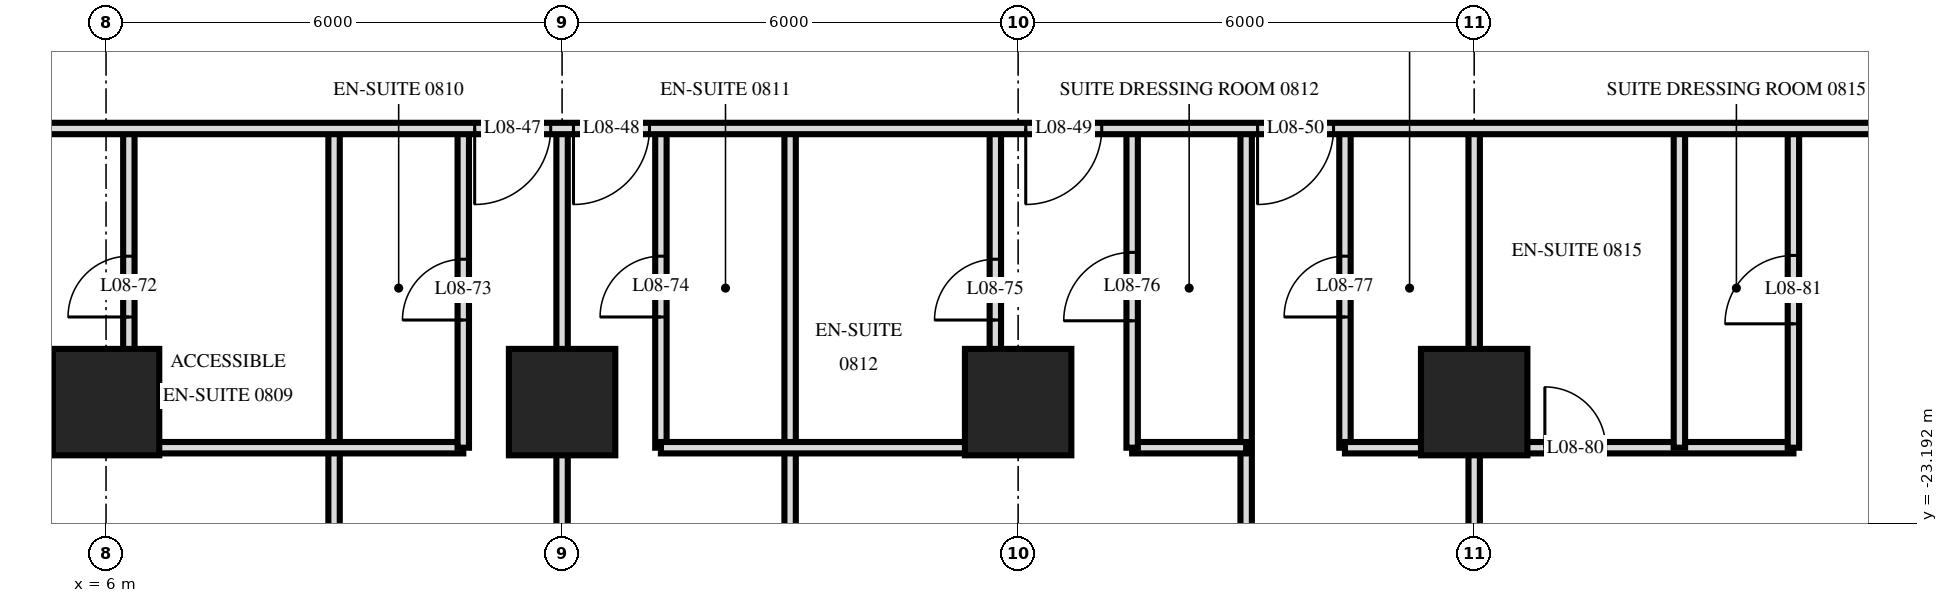
"""IFC4 building model, lengths in metres.
Left out: names, types, materials, properties, quantities, classifications, styles, units other than length and angle.
Written with IfcOpenShell. Run it as: python <this file> out.ifc"""

import sys

from ifc_helpers import new_model, si_unit, direction, frame, frame_2d, origin, origin_2d, place, context, subcontext, project, spatial, rectangle, extrude, element, fill, save


model = new_model("IFC4")
c1 = context("Model", 3, precision=1e-05, world=origin(), true_north=direction((0.0, 1.0)))
c2 = subcontext(c1, "Body", "Model", "MODEL_VIEW")
j1 = project(units=[si_unit("LENGTHUNIT", "METRE"), si_unit("PLANEANGLEUNIT", "RADIAN")], contexts=[c1])
p1 = place(None, origin())
s1 = spatial("IfcSite", under=j1, at=p1, CompositionType="ELEMENT")
p2 = place(p1, origin())
s2 = spatial("IfcBuilding", under=s1, at=p2, CompositionType="ELEMENT")
p3 = place(p2, frame((0.0, 0.0, 38.4)))
s3 = spatial("IfcBuildingStorey", under=s2, at=p3, CompositionType="ELEMENT", Elevation=38.4)
for number, where, z_axis, x_axis in (
    (1, (6.0, -21.6, 0.0), (0.0, 0.0, 1.0), (1.0, 0.0, 0.0)),
    (2, (12.0, -21.6, 0.0), (0.0, 0.0, 1.0), (1.0, 0.0, 0.0)),
    (3, (18.0, -21.6, 0.0), (0.0, 0.0, 1.0), (1.0, 0.0, 0.0)),
    (4, (24.0, -21.6, 0.0), (0.0, 0.0, 1.0), (1.0, 0.0, 0.0)),
):
    element("IfcColumn", number, at=place(p3, frame(where, z_axis=z_axis, x_axis=x_axis)), inside=s3, PredefinedType="COLUMN", context=c2, shape_type="SweptSolid", body=[
        extrude(rectangle(XDim=1.4, YDim=1.4, at=origin_2d()), origin(), (0.0, 0.0, 1.0), 3.6),
    ])
p4 = place(p3, frame((28.2, -22.2, 0.0), z_axis=(0.0, 0.0, 1.0), x_axis=(0.0, 1.0, 0.0)))
e5 = element("IfcWall", 5, at=p4, inside=s3, PredefinedType="PARTITIONING", context=c2, shape_type="SweptSolid", body=[
    extrude(rectangle(XDim=4.2, YDim=0.15, at=frame_2d((2.1, 0.0))), origin(), (0.0, 0.0, 1.0), 3.32),
])
p5 = place(p4, frame((1.63, 0.0, 0.0)))
e6 = element("IfcOpeningElement", 6, at=p5, cuts=e5, PredefinedType="OPENING", context=c2, shape_type="SweptSolid", body=[
    extrude(rectangle(XDim=0.9, YDim=2.1, at=frame_2d((0.45, 1.05))), frame((0.0, 0.085, 0.0), z_axis=(0.0, -1.0, 0.0), x_axis=(1.0, 0.0, 0.0)), (0.0, 0.0, 1.0), 0.17),
])
p6 = place(p3, frame((26.7, -22.2, 0.0), z_axis=(0.0, 0.0, 1.0), x_axis=(0.0, 1.0, 0.0)))
e7 = element("IfcWall", 7, at=p6, inside=s3, PredefinedType="PARTITIONING", context=c2, shape_type="SweptSolid", body=[
    extrude(rectangle(XDim=4.2, YDim=0.15, at=frame_2d((2.1, 0.0))), origin(), (0.0, 0.0, 1.0), 3.32),
])
p7 = place(p3, frame((24.0, -29.22, 0.0), z_axis=(0.0, 0.0, 1.0), x_axis=(0.0, 1.0, 0.0)))
e8 = element("IfcWall", 8, at=p7, inside=s3, PredefinedType="PARTITIONING", context=c2, shape_type="SweptSolid", body=[
    extrude(rectangle(XDim=11.22, YDim=0.15, at=frame_2d((5.61, 0.0))), origin(), (0.0, 0.0, 1.0), 3.32),
])
p8 = place(p3, frame((22.3, -22.2, 0.0), z_axis=(0.0, 0.0, 1.0), x_axis=(0.0, 1.0, 0.0)))
e9 = element("IfcWall", 9, at=p8, inside=s3, PredefinedType="PARTITIONING", context=c2, shape_type="SweptSolid", body=[
    extrude(rectangle(XDim=4.2, YDim=0.15, at=frame_2d((2.1, 0.0))), origin(), (0.0, 0.0, 1.0), 3.32),
])
p9 = place(p8, frame((1.72, 0.0, 0.0)))
e10 = element("IfcOpeningElement", 10, at=p9, cuts=e9, PredefinedType="OPENING", context=c2, shape_type="SweptSolid", body=[
    extrude(rectangle(XDim=0.8, YDim=2.1, at=frame_2d((0.4, 1.05))), frame((0.0, 0.085, 0.0), z_axis=(0.0, -1.0, 0.0), x_axis=(1.0, 0.0, 0.0)), (0.0, 0.0, 1.0), 0.17),
])
p10 = place(p3, frame((21.0, -29.22, 0.0), z_axis=(0.0, 0.0, 1.0), x_axis=(0.0, 1.0, 0.0)))
e11 = element("IfcWall", 11, at=p10, inside=s3, PredefinedType="PARTITIONING", context=c2, shape_type="SweptSolid", body=[
    extrude(rectangle(XDim=11.22, YDim=0.15, at=frame_2d((5.61, 0.0))), origin(), (0.0, 0.0, 1.0), 3.32),
])
p11 = place(p3, frame((19.5, -22.2, 0.0), z_axis=(0.0, 0.0, 1.0), x_axis=(0.0, 1.0, 0.0)))
e12 = element("IfcWall", 12, at=p11, inside=s3, PredefinedType="PARTITIONING", context=c2, shape_type="SweptSolid", body=[
    extrude(rectangle(XDim=4.2, YDim=0.15, at=frame_2d((2.1, 0.0))), origin(), (0.0, 0.0, 1.0), 3.32),
])
p12 = place(p11, frame((1.67, 0.0, 0.0)))
e13 = element("IfcOpeningElement", 13, at=p12, cuts=e12, PredefinedType="OPENING", context=c2, shape_type="SweptSolid", body=[
    extrude(rectangle(XDim=0.9, YDim=2.1, at=frame_2d((0.45, 1.05))), frame((0.0, 0.085, 0.0), z_axis=(0.0, -1.0, 0.0), x_axis=(1.0, 0.0, 0.0)), (0.0, 0.0, 1.0), 0.17),
])
p13 = place(p3, frame((17.7, -22.2, 0.0), z_axis=(0.0, 0.0, 1.0), x_axis=(0.0, 1.0, 0.0)))
e14 = element("IfcWall", 14, at=p13, inside=s3, PredefinedType="PARTITIONING", context=c2, shape_type="SweptSolid", body=[
    extrude(rectangle(XDim=4.2, YDim=0.15, at=frame_2d((2.1, 0.0))), origin(), (0.0, 0.0, 1.0), 3.32),
])
p14 = place(p13, frame((1.68, 0.0, 0.0)))
e15 = element("IfcOpeningElement", 15, at=p14, cuts=e14, PredefinedType="OPENING", context=c2, shape_type="SweptSolid", body=[
    extrude(rectangle(XDim=0.8, YDim=2.1, at=frame_2d((0.4, 1.05))), frame((0.0, 0.085, 0.0), z_axis=(0.0, -1.0, 0.0), x_axis=(1.0, 0.0, 0.0)), (0.0, 0.0, 1.0), 0.17),
])
p15 = place(p3, frame((15.0, -29.22, 0.0), z_axis=(0.0, 0.0, 1.0), x_axis=(0.0, 1.0, 0.0)))
e16 = element("IfcWall", 16, at=p15, inside=s3, PredefinedType="PARTITIONING", context=c2, shape_type="SweptSolid", body=[
    extrude(rectangle(XDim=11.22, YDim=0.15, at=frame_2d((5.61, 0.0))), origin(), (0.0, 0.0, 1.0), 3.32),
])
p16 = place(p3, frame((13.3, -22.2, 0.0), z_axis=(0.0, 0.0, 1.0), x_axis=(0.0, 1.0, 0.0)))
e17 = element("IfcWall", 17, at=p16, inside=s3, PredefinedType="PARTITIONING", context=c2, shape_type="SweptSolid", body=[
    extrude(rectangle(XDim=4.2, YDim=0.15, at=frame_2d((2.1, 0.0))), origin(), (0.0, 0.0, 1.0), 3.32),
])
p17 = place(p16, frame((1.72, 0.0, 0.0)))
e18 = element("IfcOpeningElement", 18, at=p17, cuts=e17, PredefinedType="OPENING", context=c2, shape_type="SweptSolid", body=[
    extrude(rectangle(XDim=0.8, YDim=2.1, at=frame_2d((0.4, 1.05))), frame((0.0, 0.085, 0.0), z_axis=(0.0, -1.0, 0.0), x_axis=(1.0, 0.0, 0.0)), (0.0, 0.0, 1.0), 0.17),
])
p18 = place(p3, frame((12.0, -29.22, 0.0), z_axis=(0.0, 0.0, 1.0), x_axis=(0.0, 1.0, 0.0)))
e19 = element("IfcWall", 19, at=p18, inside=s3, PredefinedType="PARTITIONING", context=c2, shape_type="SweptSolid", body=[
    extrude(rectangle(XDim=11.22, YDim=0.15, at=frame_2d((5.61, 0.0))), origin(), (0.0, 0.0, 1.0), 3.32),
])
p19 = place(p3, frame((10.7, -22.2, 0.0), z_axis=(0.0, 0.0, 1.0), x_axis=(0.0, 1.0, 0.0)))
e20 = element("IfcWall", 20, at=p19, inside=s3, PredefinedType="PARTITIONING", context=c2, shape_type="SweptSolid", body=[
    extrude(rectangle(XDim=4.2, YDim=0.15, at=frame_2d((2.1, 0.0))), origin(), (0.0, 0.0, 1.0), 3.32),
])
p20 = place(p19, frame((1.68, 0.0, 0.0)))
e21 = element("IfcOpeningElement", 21, at=p20, cuts=e20, PredefinedType="OPENING", context=c2, shape_type="SweptSolid", body=[
    extrude(rectangle(XDim=0.8, YDim=2.1, at=frame_2d((0.4, 1.05))), frame((0.0, 0.085, 0.0), z_axis=(0.0, -1.0, 0.0), x_axis=(1.0, 0.0, 0.0)), (0.0, 0.0, 1.0), 0.17),
])
p21 = place(p3, frame((9.0, -29.22, 0.0), z_axis=(0.0, 0.0, 1.0), x_axis=(0.0, 1.0, 0.0)))
e22 = element("IfcWall", 22, at=p21, inside=s3, PredefinedType="PARTITIONING", context=c2, shape_type="SweptSolid", body=[
    extrude(rectangle(XDim=11.22, YDim=0.15, at=frame_2d((5.61, 0.0))), origin(), (0.0, 0.0, 1.0), 3.32),
])
p22 = place(p3, frame((6.3, -22.2, 0.0), z_axis=(0.0, 0.0, 1.0), x_axis=(0.0, 1.0, 0.0)))
e23 = element("IfcWall", 23, at=p22, inside=s3, PredefinedType="PARTITIONING", context=c2, shape_type="SweptSolid", body=[
    extrude(rectangle(XDim=4.2, YDim=0.15, at=frame_2d((2.1, 0.0))), origin(), (0.0, 0.0, 1.0), 3.32),
])
p23 = place(p22, frame((1.72, 0.0, 0.0)))
e24 = element("IfcOpeningElement", 24, at=p23, cuts=e23, PredefinedType="OPENING", context=c2, shape_type="SweptSolid", body=[
    extrude(rectangle(XDim=0.8, YDim=2.1, at=frame_2d((0.4, 1.05))), frame((0.0, 0.085, 0.0), z_axis=(0.0, -1.0, 0.0), x_axis=(1.0, 0.0, 0.0)), (0.0, 0.0, 1.0), 0.17),
])
for number, where, z_axis, x_axis in (
    (25, (6.3, -22.2, 0.0), (0.0, 0.0, 1.0), (1.0, 0.0, 0.0)),
    (26, (13.3, -22.2, 0.0), (0.0, 0.0, 1.0), (1.0, 0.0, 0.0)),
):
    element("IfcWall", number, at=place(p3, frame(where, z_axis=z_axis, x_axis=x_axis)), inside=s3, PredefinedType="PARTITIONING", context=c2, shape_type="SweptSolid", body=[
        extrude(rectangle(XDim=4.4, YDim=0.15, at=frame_2d((2.2, 0.0))), origin(), (0.0, 0.0, 1.0), 3.32),
    ])
p24 = place(p3, frame((19.5, -22.2, 0.0), z_axis=(0.0, 0.0, 1.0), x_axis=(1.0, 0.0, 0.0)))
e27 = element("IfcWall", 27, at=p24, inside=s3, PredefinedType="PARTITIONING", context=c2, shape_type="SweptSolid", body=[
    extrude(rectangle(XDim=1.5, YDim=0.15, at=frame_2d((0.75, 0.0))), origin(), (0.0, 0.0, 1.0), 3.32),
])
p25 = place(p3, frame((22.3, -22.2, 0.0), z_axis=(0.0, 0.0, 1.0), x_axis=(1.0, 0.0, 0.0)))
e28 = element("IfcWall", 28, at=p25, inside=s3, PredefinedType="PARTITIONING", context=c2, shape_type="SweptSolid", body=[
    extrude(rectangle(XDim=5.9, YDim=0.15, at=frame_2d((2.95, 0.0))), origin(), (0.0, 0.0, 1.0), 3.32),
])
p26 = place(p25, frame((2.63, 0.0, 0.0)))
e29 = element("IfcOpeningElement", 29, at=p26, cuts=e28, PredefinedType="OPENING", context=c2, shape_type="SweptSolid", body=[
    extrude(rectangle(XDim=0.8, YDim=2.1, at=frame_2d((0.4, 1.05))), frame((0.0, 0.085, 0.0), z_axis=(0.0, -1.0, 0.0), x_axis=(1.0, 0.0, 0.0)), (0.0, 0.0, 1.0), 0.17),
])
p27 = place(p3, frame((-33.12, -18.0, 0.0), z_axis=(0.0, 0.0, 1.0), x_axis=(1.0, 0.0, 0.0)))
e30 = element("IfcWall", 30, at=p27, inside=s3, PredefinedType="PARTITIONING", context=c2, shape_type="SweptSolid", body=[
    extrude(rectangle(XDim=66.24, YDim=0.15, at=frame_2d((33.12, 0.0))), origin(), (0.0, 0.0, 1.0), 3.32),
])
p28 = place(p27, frame((12.27, 0.0, 0.0)))
e31 = element("IfcOpeningElement", 31, at=p28, cuts=e30, PredefinedType="OPENING", context=c2, shape_type="SweptSolid", body=[
    extrude(rectangle(XDim=1.0, YDim=2.1, at=frame_2d((0.5, 1.05))), frame((0.0, 0.085, 0.0), z_axis=(0.0, -1.0, 0.0), x_axis=(1.0, 0.0, 0.0)), (0.0, 0.0, 1.0), 0.17),
])
p29 = place(p27, frame((16.97, 0.0, 0.0)))
e32 = element("IfcOpeningElement", 32, at=p29, cuts=e30, PredefinedType="OPENING", context=c2, shape_type="SweptSolid", body=[
    extrude(rectangle(XDim=1.0, YDim=2.1, at=frame_2d((0.5, 1.05))), frame((0.0, 0.085, 0.0), z_axis=(0.0, -1.0, 0.0), x_axis=(1.0, 0.0, 0.0)), (0.0, 0.0, 1.0), 0.17),
])
p30 = place(p27, frame((18.27, 0.0, 0.0)))
e33 = element("IfcOpeningElement", 33, at=p30, cuts=e30, PredefinedType="OPENING", context=c2, shape_type="SweptSolid", body=[
    extrude(rectangle(XDim=1.0, YDim=2.1, at=frame_2d((0.5, 1.05))), frame((0.0, 0.085, 0.0), z_axis=(0.0, -1.0, 0.0), x_axis=(1.0, 0.0, 0.0)), (0.0, 0.0, 1.0), 0.17),
])
p31 = place(p27, frame((22.97, 0.0, 0.0)))
e34 = element("IfcOpeningElement", 34, at=p31, cuts=e30, PredefinedType="OPENING", context=c2, shape_type="SweptSolid", body=[
    extrude(rectangle(XDim=1.0, YDim=2.1, at=frame_2d((0.5, 1.05))), frame((0.0, 0.085, 0.0), z_axis=(0.0, -1.0, 0.0), x_axis=(1.0, 0.0, 0.0)), (0.0, 0.0, 1.0), 0.17),
])
p32 = place(p27, frame((24.27, 0.0, 0.0)))
e35 = element("IfcOpeningElement", 35, at=p32, cuts=e30, PredefinedType="OPENING", context=c2, shape_type="SweptSolid", body=[
    extrude(rectangle(XDim=1.0, YDim=2.1, at=frame_2d((0.5, 1.05))), frame((0.0, 0.085, 0.0), z_axis=(0.0, -1.0, 0.0), x_axis=(1.0, 0.0, 0.0)), (0.0, 0.0, 1.0), 0.17),
])
p33 = place(p27, frame((28.97, 0.0, 0.0)))
e36 = element("IfcOpeningElement", 36, at=p33, cuts=e30, PredefinedType="OPENING", context=c2, shape_type="SweptSolid", body=[
    extrude(rectangle(XDim=1.0, YDim=2.1, at=frame_2d((0.5, 1.05))), frame((0.0, 0.085, 0.0), z_axis=(0.0, -1.0, 0.0), x_axis=(1.0, 0.0, 0.0)), (0.0, 0.0, 1.0), 0.17),
])
p34 = place(p27, frame((30.27, 0.0, 0.0)))
e37 = element("IfcOpeningElement", 37, at=p34, cuts=e30, PredefinedType="OPENING", context=c2, shape_type="SweptSolid", body=[
    extrude(rectangle(XDim=1.0, YDim=2.1, at=frame_2d((0.5, 1.05))), frame((0.0, 0.085, 0.0), z_axis=(0.0, -1.0, 0.0), x_axis=(1.0, 0.0, 0.0)), (0.0, 0.0, 1.0), 0.17),
])
p35 = place(p27, frame((34.97, 0.0, 0.0)))
e38 = element("IfcOpeningElement", 38, at=p35, cuts=e30, PredefinedType="OPENING", context=c2, shape_type="SweptSolid", body=[
    extrude(rectangle(XDim=1.0, YDim=2.1, at=frame_2d((0.5, 1.05))), frame((0.0, 0.085, 0.0), z_axis=(0.0, -1.0, 0.0), x_axis=(1.0, 0.0, 0.0)), (0.0, 0.0, 1.0), 0.17),
])
p36 = place(p27, frame((37.27, 0.0, 0.0)))
e39 = element("IfcOpeningElement", 39, at=p36, cuts=e30, PredefinedType="OPENING", context=c2, shape_type="SweptSolid", body=[
    extrude(rectangle(XDim=1.0, YDim=2.1, at=frame_2d((0.5, 1.05))), frame((0.0, 0.085, 0.0), z_axis=(0.0, -1.0, 0.0), x_axis=(1.0, 0.0, 0.0)), (0.0, 0.0, 1.0), 0.17),
])
p37 = place(p27, frame((43.97, 0.0, 0.0)))
e40 = element("IfcOpeningElement", 40, at=p37, cuts=e30, PredefinedType="OPENING", context=c2, shape_type="SweptSolid", body=[
    extrude(rectangle(XDim=1.0, YDim=2.1, at=frame_2d((0.5, 1.05))), frame((0.0, 0.085, 0.0), z_axis=(0.0, -1.0, 0.0), x_axis=(1.0, 0.0, 0.0)), (0.0, 0.0, 1.0), 0.17),
])
p38 = place(p27, frame((45.27, 0.0, 0.0)))
e41 = element("IfcOpeningElement", 41, at=p38, cuts=e30, PredefinedType="OPENING", context=c2, shape_type="SweptSolid", body=[
    extrude(rectangle(XDim=1.0, YDim=2.1, at=frame_2d((0.5, 1.05))), frame((0.0, 0.085, 0.0), z_axis=(0.0, -1.0, 0.0), x_axis=(1.0, 0.0, 0.0)), (0.0, 0.0, 1.0), 0.17),
])
p39 = place(p27, frame((51.22, 0.0, 0.0)))
e42 = element("IfcOpeningElement", 42, at=p39, cuts=e30, PredefinedType="OPENING", context=c2, shape_type="SweptSolid", body=[
    extrude(rectangle(XDim=1.0, YDim=2.1, at=frame_2d((0.5, 1.05))), frame((0.0, 0.085, 0.0), z_axis=(0.0, -1.0, 0.0), x_axis=(1.0, 0.0, 0.0)), (0.0, 0.0, 1.0), 0.17),
])
p40 = place(p27, frame((54.27, 0.0, 0.0)))
e43 = element("IfcOpeningElement", 43, at=p40, cuts=e30, PredefinedType="OPENING", context=c2, shape_type="SweptSolid", body=[
    extrude(rectangle(XDim=1.0, YDim=2.1, at=frame_2d((0.5, 1.05))), frame((0.0, 0.085, 0.0), z_axis=(0.0, -1.0, 0.0), x_axis=(1.0, 0.0, 0.0)), (0.0, 0.0, 1.0), 0.17),
])
p41 = place(p27, frame((6.07, 0.0, 0.0)))
e44 = element("IfcOpeningElement", 44, at=p41, cuts=e30, PredefinedType="OPENING", context=c2, shape_type="SweptSolid", body=[
    extrude(rectangle(XDim=1.0, YDim=2.1, at=frame_2d((0.5, 1.05))), frame((0.0, 0.085, 0.0), z_axis=(0.0, -1.0, 0.0), x_axis=(1.0, 0.0, 0.0)), (0.0, 0.0, 1.0), 0.17),
])
p42 = place(p27, frame((63.37, 0.0, 0.0)))
e45 = element("IfcOpeningElement", 45, at=p42, cuts=e30, PredefinedType="OPENING", context=c2, shape_type="SweptSolid", body=[
    extrude(rectangle(XDim=1.0, YDim=2.1, at=frame_2d((0.5, 1.05))), frame((0.0, 0.085, 0.0), z_axis=(0.0, -1.0, 0.0), x_axis=(1.0, 0.0, 0.0)), (0.0, 0.0, 1.0), 0.17),
])
p43 = place(p37, frame((0.5, 0.0, 0.0), z_axis=(0.0, 0.0, 1.0), x_axis=(-1.0, 0.0, 0.0)))
e46 = element("IfcDoor", 46, at=p43, inside=s3, OperationType="SINGLE_SWING_LEFT", PredefinedType="DOOR", context=c2, shape_type="SweptSolid", body=[
    extrude(rectangle(XDim=1.0, YDim=2.1, at=frame_2d((0.0, 1.05))), frame((0.0, -0.025, 0.0), z_axis=(0.0, 1.0, 0.0), x_axis=(-1.0, 0.0, 0.0)), (0.0, 0.0, 1.0), 0.05),
])
fill(e40, e46)
p44 = place(p38, frame((0.5, 0.0, 0.0), z_axis=(0.0, 0.0, 1.0), x_axis=(-1.0, 0.0, 0.0)))
e47 = element("IfcDoor", 47, at=p44, inside=s3, OperationType="SINGLE_SWING_LEFT", PredefinedType="DOOR", context=c2, shape_type="SweptSolid", body=[
    extrude(rectangle(XDim=1.0, YDim=2.1, at=frame_2d((0.0, 1.05))), frame((0.0, -0.025, 0.0), z_axis=(0.0, 1.0, 0.0), x_axis=(-1.0, 0.0, 0.0)), (0.0, 0.0, 1.0), 0.05),
])
fill(e41, e47)
p45 = place(p39, frame((0.5, 0.0, 0.0), z_axis=(0.0, 0.0, 1.0), x_axis=(-1.0, 0.0, 0.0)))
e48 = element("IfcDoor", 48, at=p45, inside=s3, OperationType="SINGLE_SWING_LEFT", PredefinedType="DOOR", context=c2, shape_type="SweptSolid", body=[
    extrude(rectangle(XDim=1.0, YDim=2.1, at=frame_2d((0.0, 1.05))), frame((0.0, -0.025, 0.0), z_axis=(0.0, 1.0, 0.0), x_axis=(-1.0, 0.0, 0.0)), (0.0, 0.0, 1.0), 0.05),
])
fill(e42, e48)
p46 = place(p40, frame((0.5, 0.0, 0.0), z_axis=(0.0, 0.0, 1.0), x_axis=(-1.0, 0.0, 0.0)))
e49 = element("IfcDoor", 49, at=p46, inside=s3, OperationType="SINGLE_SWING_LEFT", PredefinedType="DOOR", context=c2, shape_type="SweptSolid", body=[
    extrude(rectangle(XDim=1.0, YDim=2.1, at=frame_2d((0.0, 1.05))), frame((0.0, -0.025, 0.0), z_axis=(0.0, 1.0, 0.0), x_axis=(-1.0, 0.0, 0.0)), (0.0, 0.0, 1.0), 0.05),
])
fill(e43, e49)
p47 = place(p23, origin())
e50 = element("IfcDoor", 50, at=p47, inside=s3, OperationType="SINGLE_SWING_RIGHT", PredefinedType="DOOR", context=c2, shape_type="SweptSolid", body=[
    extrude(rectangle(XDim=0.8, YDim=2.1, at=frame_2d((0.4, 1.05))), frame((0.0, 0.025, 0.0), z_axis=(0.0, -1.0, 0.0), x_axis=(1.0, 0.0, 0.0)), (0.0, 0.0, 1.0), 0.05),
])
fill(e24, e50)
p48 = place(p20, origin())
e51 = element("IfcDoor", 51, at=p48, inside=s3, OperationType="SINGLE_SWING_RIGHT", PredefinedType="DOOR", context=c2, shape_type="SweptSolid", body=[
    extrude(rectangle(XDim=0.8, YDim=2.1, at=frame_2d((0.4, 1.05))), frame((0.0, 0.025, 0.0), z_axis=(0.0, -1.0, 0.0), x_axis=(1.0, 0.0, 0.0)), (0.0, 0.0, 1.0), 0.05),
])
fill(e21, e51)
p49 = place(p17, origin())
e52 = element("IfcDoor", 52, at=p49, inside=s3, OperationType="SINGLE_SWING_RIGHT", PredefinedType="DOOR", context=c2, shape_type="SweptSolid", body=[
    extrude(rectangle(XDim=0.8, YDim=2.1, at=frame_2d((0.4, 1.05))), frame((0.0, 0.025, 0.0), z_axis=(0.0, -1.0, 0.0), x_axis=(1.0, 0.0, 0.0)), (0.0, 0.0, 1.0), 0.05),
])
fill(e18, e52)
p50 = place(p14, origin())
e53 = element("IfcDoor", 53, at=p50, inside=s3, OperationType="SINGLE_SWING_RIGHT", PredefinedType="DOOR", context=c2, shape_type="SweptSolid", body=[
    extrude(rectangle(XDim=0.8, YDim=2.1, at=frame_2d((0.4, 1.05))), frame((0.0, 0.025, 0.0), z_axis=(0.0, -1.0, 0.0), x_axis=(1.0, 0.0, 0.0)), (0.0, 0.0, 1.0), 0.05),
])
fill(e15, e53)
p51 = place(p12, origin())
e54 = element("IfcDoor", 54, at=p51, inside=s3, OperationType="SINGLE_SWING_RIGHT", PredefinedType="DOOR", context=c2, shape_type="SweptSolid", body=[
    extrude(rectangle(XDim=0.9, YDim=2.1, at=frame_2d((0.45, 1.05))), frame((0.0, 0.025, 0.0), z_axis=(0.0, -1.0, 0.0), x_axis=(1.0, 0.0, 0.0)), (0.0, 0.0, 1.0), 0.05),
])
fill(e13, e54)
p52 = place(p9, origin())
e55 = element("IfcDoor", 55, at=p52, inside=s3, OperationType="SINGLE_SWING_RIGHT", PredefinedType="DOOR", context=c2, shape_type="SweptSolid", body=[
    extrude(rectangle(XDim=0.8, YDim=2.1, at=frame_2d((0.4, 1.05))), frame((0.0, 0.025, 0.0), z_axis=(0.0, -1.0, 0.0), x_axis=(1.0, 0.0, 0.0)), (0.0, 0.0, 1.0), 0.05),
])
fill(e10, e55)
p53 = place(p26, origin())
e56 = element("IfcDoor", 56, at=p53, inside=s3, OperationType="SINGLE_SWING_RIGHT", PredefinedType="DOOR", context=c2, shape_type="SweptSolid", body=[
    extrude(rectangle(XDim=0.8, YDim=2.1, at=frame_2d((0.4, 1.05))), frame((0.0, 0.025, 0.0), z_axis=(0.0, -1.0, 0.0), x_axis=(1.0, 0.0, 0.0)), (0.0, 0.0, 1.0), 0.05),
])
fill(e29, e56)
p54 = place(p5, origin())
e57 = element("IfcDoor", 57, at=p54, inside=s3, OperationType="SINGLE_SWING_RIGHT", PredefinedType="DOOR", context=c2, shape_type="SweptSolid", body=[
    extrude(rectangle(XDim=0.9, YDim=2.1, at=frame_2d((0.45, 1.05))), frame((0.0, 0.025, 0.0), z_axis=(0.0, -1.0, 0.0), x_axis=(1.0, 0.0, 0.0)), (0.0, 0.0, 1.0), 0.05),
])
fill(e6, e57)
save(model, sys.argv[1])
